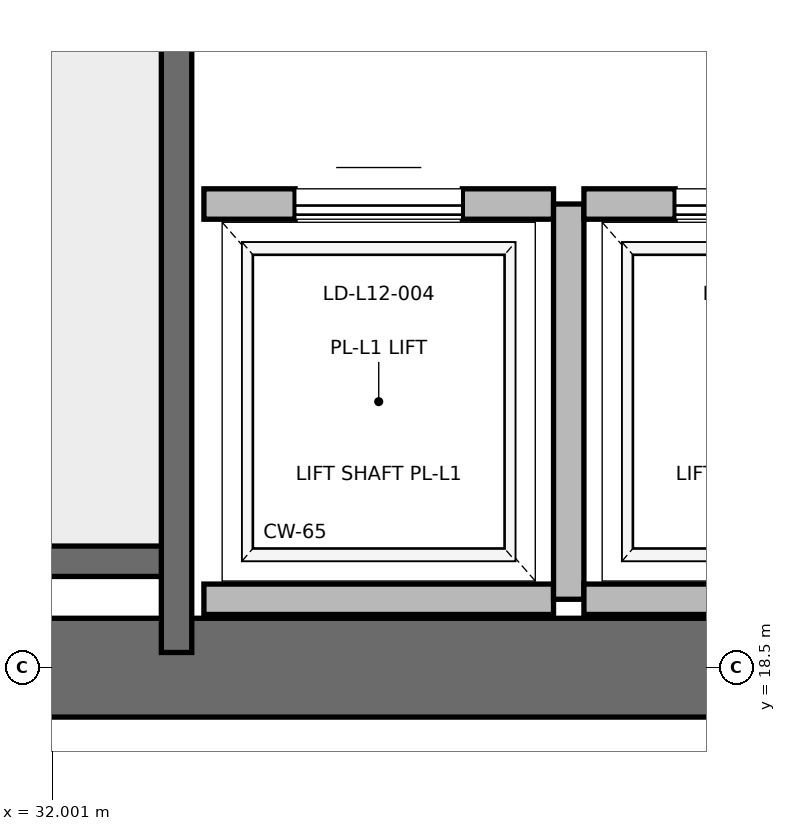
"""IFC4 building model, lengths in metres.
Left out: names, types, materials, properties, quantities, classifications, styles, units other than length and angle.
Written with IfcOpenShell. Run it as: python <this file> out.ifc"""

import sys

from ifc_helpers import new_model, si_unit, direction, frame, frame_2d, origin, place, context, subcontext, project, spatial, rectangle, extrude, element, fill, save


model = new_model("IFC4")
c1 = context("Model", 3, precision=1e-05, world=origin(), true_north=direction((0.0, 1.0)))
c2 = subcontext(c1, "Body", "Model", "MODEL_VIEW")
j1 = project(units=[si_unit("LENGTHUNIT", "METRE"), si_unit("PLANEANGLEUNIT", "RADIAN")], contexts=[c1])
p1 = place(None, origin())
s1 = spatial("IfcSite", under=j1, at=p1, CompositionType="ELEMENT")
p2 = place(p1, origin())
s2 = spatial("IfcBuilding", under=s1, at=p2, CompositionType="ELEMENT")
p3 = place(p2, frame((0.0, 0.0, 55.6)))
s3 = spatial("IfcBuildingStorey", under=s2, at=p3, CompositionType="ELEMENT", Elevation=55.6)
p4 = place(p3, frame((29.0, 18.5, 0.0), z_axis=(0.0, 0.0, 1.0), x_axis=(1.0, 0.0, 0.0)))
e1 = element("IfcWall", 1, at=p4, inside=s3, PredefinedType="SHEAR", context=c2, shape_type="SweptSolid", body=[
    extrude(rectangle(XDim=9.2, YDim=0.65, at=frame_2d((4.6, 0.0))), origin(), (0.0, 0.0, 1.0), 3.76),
])
p5 = place(p3, frame((29.7, 19.2, 0.0), z_axis=(0.0, 0.0, 1.0), x_axis=(1.0, 0.0, 0.0)))
e2 = element("IfcWall", 2, at=p5, inside=s3, PredefinedType="SOLIDWALL", context=c2, shape_type="SweptSolid", body=[
    extrude(rectangle(XDim=3.12, YDim=0.2, at=frame_2d((1.56, 0.0))), origin(), (0.0, 0.0, 1.0), 3.76),
])
p6 = place(p3, frame((32.82, 18.6, 0.0), z_axis=(0.0, 0.0, 1.0), x_axis=(0.0, 1.0, 0.0)))
e3 = element("IfcWall", 3, at=p6, inside=s3, PredefinedType="SOLIDWALL", context=c2, shape_type="SweptSolid", body=[
    extrude(rectangle(XDim=8.78, YDim=0.2, at=frame_2d((4.39, 0.0))), origin(), (0.0, 0.0, 1.0), 3.76),
])
p7 = place(p3, frame((33.0, 18.95, 0.0), z_axis=(0.0, 0.0, 1.0), x_axis=(1.0, 0.0, 0.0)))
e4 = element("IfcWall", 4, at=p7, inside=s3, PredefinedType="SOLIDWALL", context=c2, shape_type="SweptSolid", body=[
    extrude(rectangle(XDim=2.3, YDim=0.2, at=frame_2d((1.15, 0.0))), origin(), (0.0, 0.0, 1.0), 3.76),
])
p8 = place(p3, frame((35.3, 21.55, 0.0), z_axis=(0.0, 0.0, 1.0), x_axis=(-1.0, 0.0, 0.0)))
e5 = element("IfcWall", 5, at=p8, inside=s3, PredefinedType="SOLIDWALL", context=c2, shape_type="SweptSolid", body=[
    extrude(rectangle(XDim=2.3, YDim=0.2, at=frame_2d((1.15, 0.0))), origin(), (0.0, 0.0, 1.0), 3.76),
])
p9 = place(p8, frame((0.6, 0.0, 0.0)))
e6 = element("IfcOpeningElement", 6, at=p9, cuts=e5, PredefinedType="OPENING", context=c2, shape_type="SweptSolid", body=[
    extrude(rectangle(XDim=1.1, YDim=2.2, at=frame_2d((0.55, 1.1))), frame((0.0, 0.1, 0.0), z_axis=(0.0, -1.0, 0.0), x_axis=(1.0, 0.0, 0.0)), (0.0, 0.0, 1.0), 0.2),
])
p10 = place(p3, frame((35.4, 18.95, 0.0), z_axis=(0.0, 0.0, 1.0), x_axis=(0.0, 1.0, 0.0)))
e7 = element("IfcWall", 7, at=p10, inside=s3, PredefinedType="SOLIDWALL", context=c2, shape_type="SweptSolid", body=[
    extrude(rectangle(XDim=2.6, YDim=0.2, at=frame_2d((1.3, 0.0))), origin(), (0.0, 0.0, 1.0), 3.76),
])
p11 = place(p3, frame((35.5, 18.95, 0.0), z_axis=(0.0, 0.0, 1.0), x_axis=(1.0, 0.0, 0.0)))
e8 = element("IfcWall", 8, at=p11, inside=s3, PredefinedType="SOLIDWALL", context=c2, shape_type="SweptSolid", body=[
    extrude(rectangle(XDim=2.3, YDim=0.2, at=frame_2d((1.15, 0.0))), origin(), (0.0, 0.0, 1.0), 2.54),
])
p12 = place(p3, frame((37.8, 21.55, 0.0), z_axis=(0.0, 0.0, 1.0), x_axis=(-1.0, 0.0, 0.0)))
e9 = element("IfcWall", 9, at=p12, inside=s3, PredefinedType="SOLIDWALL", context=c2, shape_type="SweptSolid", body=[
    extrude(rectangle(XDim=2.3, YDim=0.2, at=frame_2d((1.15, 0.0))), origin(), (0.0, 0.0, 1.0), 3.76),
])
p13 = place(p12, frame((0.6, 0.0, 0.0)))
e10 = element("IfcOpeningElement", 10, at=p13, cuts=e9, PredefinedType="OPENING", context=c2, shape_type="SweptSolid", body=[
    extrude(rectangle(XDim=1.1, YDim=2.2, at=frame_2d((0.55, 1.1))), frame((0.0, 0.1, 0.0), z_axis=(0.0, -1.0, 0.0), x_axis=(1.0, 0.0, 0.0)), (0.0, 0.0, 1.0), 0.2),
])
p14 = place(p9, origin())
e11 = element("IfcDoor", 11, at=p14, inside=s3, OperationType="SLIDING_TO_RIGHT", PredefinedType="DOOR", context=c2, shape_type="SweptSolid", body=[
    extrude(rectangle(XDim=1.1, YDim=2.2, at=frame_2d((0.55, 1.1))), frame((0.0, 0.025, 0.0), z_axis=(0.0, -1.0, 0.0), x_axis=(1.0, 0.0, 0.0)), (0.0, 0.0, 1.0), 0.05),
])
fill(e6, e11)
p15 = place(p13, origin())
e12 = element("IfcDoor", 12, at=p15, inside=s3, OperationType="SLIDING_TO_RIGHT", PredefinedType="DOOR", context=c2, shape_type="SweptSolid", body=[
    extrude(rectangle(XDim=1.1, YDim=2.2, at=frame_2d((0.55, 1.1))), frame((0.0, 0.025, 0.0), z_axis=(0.0, -1.0, 0.0), x_axis=(1.0, 0.0, 0.0)), (0.0, 0.0, 1.0), 0.05),
])
fill(e10, e12)
save(model, sys.argv[1])
